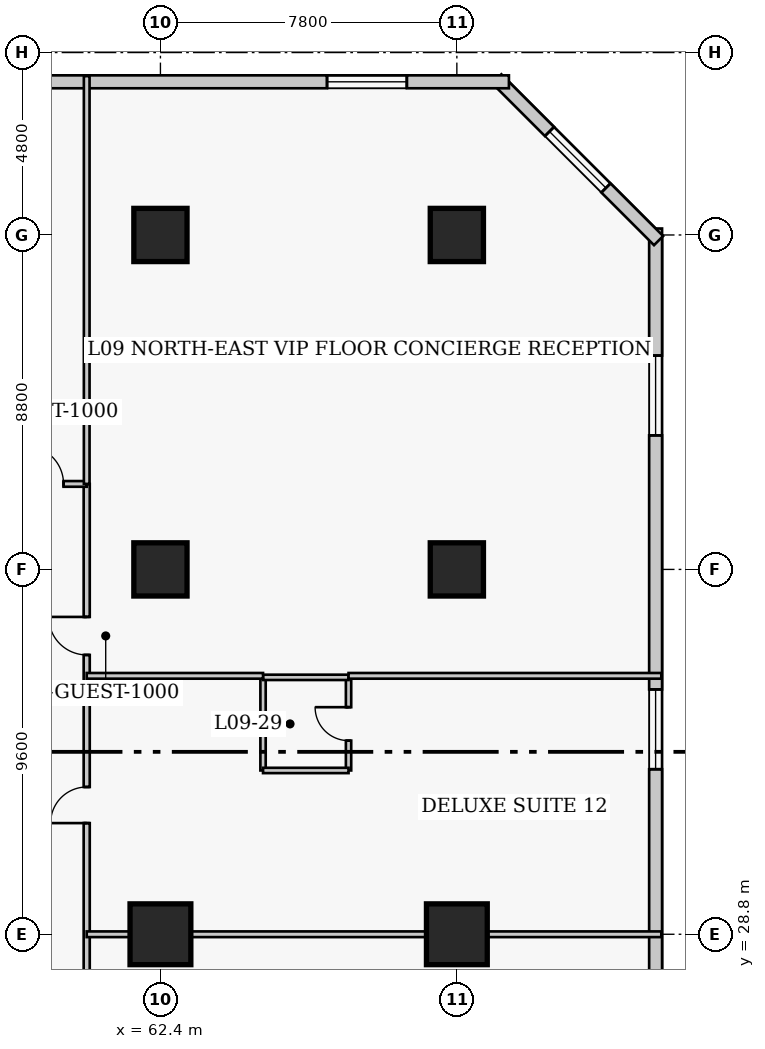
"""IFC4 building model, lengths in metres.
Left out: names, types, materials, properties, quantities, classifications, styles, units other than length and angle.
Written with IfcOpenShell. Run it as: python <this file> out.ifc"""

import sys

from ifc_helpers import new_model, si_unit, direction, frame, frame_2d, origin, origin_2d, place, context, subcontext, project, spatial, rectangle, extrude, element, fill, save


model = new_model("IFC4")
c1 = context("Model", 3, precision=1e-05, world=origin(), true_north=direction((0.0, 1.0)))
c2 = subcontext(c1, "Body", "Model", "MODEL_VIEW")
j1 = project(units=[si_unit("LENGTHUNIT", "METRE"), si_unit("PLANEANGLEUNIT", "RADIAN")], contexts=[c1])
p1 = place(None, origin())
s1 = spatial("IfcSite", under=j1, at=p1, CompositionType="ELEMENT")
p2 = place(p1, origin())
s2 = spatial("IfcBuilding", under=s1, at=p2, CompositionType="ELEMENT")
p3 = place(p2, frame((0.0, 0.0, 41.2)))
s3 = spatial("IfcBuildingStorey", under=s2, at=p3, CompositionType="ELEMENT", Elevation=41.2)
p4 = place(p3, frame((62.4, 28.8, 0.0), z_axis=(0.0, 0.0, 1.0), x_axis=(1.0, 0.0, 0.0)))
e1 = element("IfcColumn", 1, at=p4, inside=s3, PredefinedType="COLUMN", context=c2, shape_type="SweptSolid", body=[
    extrude(rectangle(XDim=1.6, YDim=1.6, at=origin_2d()), origin(), (0.0, 0.0, 1.0), 3.8),
])
for number, where, z_axis, x_axis in (
    (2, (62.4, 38.4, 0.0), (0.0, 0.0, 1.0), (1.0, 0.0, 0.0)),
    (3, (62.4, 47.2, 0.0), (0.0, 0.0, 1.0), (1.0, 0.0, 0.0)),
):
    element("IfcColumn", number, at=place(p3, frame(where, z_axis=z_axis, x_axis=x_axis)), inside=s3, PredefinedType="COLUMN", context=c2, shape_type="SweptSolid", body=[
        extrude(rectangle(XDim=1.4, YDim=1.4, at=origin_2d()), origin(), (0.0, 0.0, 1.0), 3.8),
    ])
p5 = place(p3, frame((70.2, 28.8, 0.0), z_axis=(0.0, 0.0, 1.0), x_axis=(1.0, 0.0, 0.0)))
e4 = element("IfcColumn", 4, at=p5, inside=s3, PredefinedType="COLUMN", context=c2, shape_type="SweptSolid", body=[
    extrude(rectangle(XDim=1.6, YDim=1.6, at=origin_2d()), origin(), (0.0, 0.0, 1.0), 3.8),
])
for number, where, z_axis, x_axis in (
    (5, (70.2, 38.4, 0.0), (0.0, 0.0, 1.0), (1.0, 0.0, 0.0)),
    (6, (70.2, 47.2, 0.0), (0.0, 0.0, 1.0), (1.0, 0.0, 0.0)),
):
    element("IfcColumn", number, at=place(p3, frame(where, z_axis=z_axis, x_axis=x_axis)), inside=s3, PredefinedType="COLUMN", context=c2, shape_type="SweptSolid", body=[
        extrude(rectangle(XDim=1.4, YDim=1.4, at=origin_2d()), origin(), (0.0, 0.0, 1.0), 3.8),
    ])
p6 = place(p3, frame((75.43, 12.23, 0.0), z_axis=(0.0, 0.0, 1.0), x_axis=(0.0, 1.0, 0.0)))
e7 = element("IfcWall", 7, at=p6, inside=s3, PredefinedType="SOLIDWALL", context=c2, shape_type="SweptSolid", body=[
    extrude(rectangle(XDim=35.14, YDim=0.34, at=frame_2d((17.57, 0.0))), origin(), (0.0, 0.0, 1.0), 3.54),
])
p7 = place(p6, frame((3.343, 0.0, 0.85)))
e8 = element("IfcOpeningElement", 8, at=p7, cuts=e7, PredefinedType="OPENING", context=c2, shape_type="SweptSolid", body=[
    extrude(rectangle(XDim=2.1, YDim=1.85, at=frame_2d((1.05, 0.925))), frame((0.0, 0.18, 0.0), z_axis=(0.0, -1.0, 0.0), x_axis=(1.0, 0.0, 0.0)), (0.0, 0.0, 1.0), 0.36),
])
p8 = place(p6, frame((12.127, 0.0, 0.85)))
e9 = element("IfcOpeningElement", 9, at=p8, cuts=e7, PredefinedType="OPENING", context=c2, shape_type="SweptSolid", body=[
    extrude(rectangle(XDim=2.1, YDim=1.85, at=frame_2d((1.05, 0.925))), frame((0.0, 0.18, 0.0), z_axis=(0.0, -1.0, 0.0), x_axis=(1.0, 0.0, 0.0)), (0.0, 0.0, 1.0), 0.36),
])
p9 = place(p6, frame((20.913, 0.0, 0.85)))
e10 = element("IfcOpeningElement", 10, at=p9, cuts=e7, PredefinedType="OPENING", context=c2, shape_type="SweptSolid", body=[
    extrude(rectangle(XDim=2.1, YDim=1.85, at=frame_2d((1.05, 0.925))), frame((0.0, 0.18, 0.0), z_axis=(0.0, -1.0, 0.0), x_axis=(1.0, 0.0, 0.0)), (0.0, 0.0, 1.0), 0.36),
])
p10 = place(p6, frame((29.698, 0.0, 0.85)))
e11 = element("IfcOpeningElement", 11, at=p10, cuts=e7, PredefinedType="OPENING", context=c2, shape_type="SweptSolid", body=[
    extrude(rectangle(XDim=2.1, YDim=1.85, at=frame_2d((1.05, 0.925))), frame((0.0, 0.18, 0.0), z_axis=(0.0, -1.0, 0.0), x_axis=(1.0, 0.0, 0.0)), (0.0, 0.0, 1.0), 0.36),
])
p11 = place(p3, frame((75.508, 47.052, 0.0), z_axis=(0.0, 0.0, 1.0), x_axis=(-0.707106781187, 0.707106781187, 0.0)))
e12 = element("IfcWall", 12, at=p11, inside=s3, PredefinedType="SOLIDWALL", context=c2, shape_type="SweptSolid", body=[
    extrude(rectangle(XDim=6.02, YDim=0.34, at=frame_2d((3.01, 0.0))), origin(), (0.0, 0.0, 1.0), 3.54),
])
p12 = place(p11, frame((1.96, 0.0, 0.85)))
e13 = element("IfcOpeningElement", 13, at=p12, cuts=e12, PredefinedType="OPENING", context=c2, shape_type="SweptSolid", body=[
    extrude(rectangle(XDim=2.1, YDim=1.85, at=frame_2d((1.05, 0.925))), frame((0.0, 0.18, 0.0), z_axis=(0.0, -1.0, 0.0), x_axis=(1.0, 0.0, 0.0)), (0.0, 0.0, 1.0), 0.36),
])
p13 = place(p3, frame((71.57, 51.23, 0.0), z_axis=(0.0, 0.0, 1.0), x_axis=(-1.0, 0.0, 0.0)))
e14 = element("IfcWall", 14, at=p13, inside=s3, PredefinedType="SOLIDWALL", context=c2, shape_type="SweptSolid", body=[
    extrude(rectangle(XDim=29.89, YDim=0.34, at=frame_2d((14.945, 0.0))), origin(), (0.0, 0.0, 1.0), 3.54),
])
p14 = place(p13, frame((2.686, 0.0, 0.85)))
e15 = element("IfcOpeningElement", 15, at=p14, cuts=e14, PredefinedType="OPENING", context=c2, shape_type="SweptSolid", body=[
    extrude(rectangle(XDim=2.1, YDim=1.85, at=frame_2d((1.05, 0.925))), frame((0.0, 0.18, 0.0), z_axis=(0.0, -1.0, 0.0), x_axis=(1.0, 0.0, 0.0)), (0.0, 0.0, 1.0), 0.36),
])
p15 = place(p13, frame((17.631, 0.0, 0.85)))
e16 = element("IfcOpeningElement", 16, at=p15, cuts=e14, PredefinedType="OPENING", context=c2, shape_type="SweptSolid", body=[
    extrude(rectangle(XDim=2.1, YDim=1.85, at=frame_2d((1.05, 0.925))), frame((0.0, 0.18, 0.0), z_axis=(0.0, -1.0, 0.0), x_axis=(1.0, 0.0, 0.0)), (0.0, 0.0, 1.0), 0.36),
])
p16 = place(p13, frame((25.104, 0.0, 0.85)))
e17 = element("IfcOpeningElement", 17, at=p16, cuts=e14, PredefinedType="OPENING", context=c2, shape_type="SweptSolid", body=[
    extrude(rectangle(XDim=2.1, YDim=1.85, at=frame_2d((1.05, 0.925))), frame((0.0, 0.18, 0.0), z_axis=(0.0, -1.0, 0.0), x_axis=(1.0, 0.0, 0.0)), (0.0, 0.0, 1.0), 0.36),
])
p17 = place(p3, frame((60.46, 10.25, 0.0), z_axis=(0.0, 0.0, 1.0), x_axis=(0.0, 1.0, 0.0)))
e18 = element("IfcWall", 18, at=p17, inside=s3, PredefinedType="PARTITIONING", context=c2, shape_type="SweptSolid", body=[
    extrude(rectangle(XDim=30.4, YDim=0.16, at=frame_2d((15.2, 0.0))), origin(), (0.0, 0.0, 1.0), 3.54),
])
p18 = place(p17, frame((4.4, 0.0, 0.0)))
e19 = element("IfcOpeningElement", 19, at=p18, cuts=e18, PredefinedType="OPENING", context=c2, shape_type="SweptSolid", body=[
    extrude(rectangle(XDim=0.95, YDim=2.1, at=frame_2d((0.475, 1.05))), frame((0.0, 0.09, 0.0), z_axis=(0.0, -1.0, 0.0), x_axis=(1.0, 0.0, 0.0)), (0.0, 0.0, 1.0), 0.18),
])
p19 = place(p17, frame((13.675, 0.0, 0.0)))
e20 = element("IfcOpeningElement", 20, at=p19, cuts=e18, PredefinedType="OPENING", context=c2, shape_type="SweptSolid", body=[
    extrude(rectangle(XDim=0.95, YDim=2.1, at=frame_2d((0.475, 1.05))), frame((0.0, 0.09, 0.0), z_axis=(0.0, -1.0, 0.0), x_axis=(1.0, 0.0, 0.0)), (0.0, 0.0, 1.0), 0.18),
])
p20 = place(p17, frame((21.475, 0.0, 0.0)))
e21 = element("IfcOpeningElement", 21, at=p20, cuts=e18, PredefinedType="OPENING", context=c2, shape_type="SweptSolid", body=[
    extrude(rectangle(XDim=0.95, YDim=2.1, at=frame_2d((0.475, 1.05))), frame((0.0, 0.09, 0.0), z_axis=(0.0, -1.0, 0.0), x_axis=(1.0, 0.0, 0.0)), (0.0, 0.0, 1.0), 0.18),
])
p21 = place(p17, frame((25.9, 0.0, 0.0)))
e22 = element("IfcOpeningElement", 22, at=p21, cuts=e18, PredefinedType="OPENING", context=c2, shape_type="SweptSolid", body=[
    extrude(rectangle(XDim=1.0, YDim=2.15, at=frame_2d((0.5, 1.075))), frame((0.0, 0.09, 0.0), z_axis=(0.0, -1.0, 0.0), x_axis=(1.0, 0.0, 0.0)), (0.0, 0.0, 1.0), 0.18),
])
p22 = place(p3, frame((56.8, 40.65, 0.0), z_axis=(0.0, 0.0, 1.0), x_axis=(1.0, 0.0, 0.0)))
e23 = element("IfcWall", 23, at=p22, inside=s3, PredefinedType="PARTITIONING", context=c2, shape_type="SweptSolid", body=[
    extrude(rectangle(XDim=3.66, YDim=0.15, at=frame_2d((1.83, 0.0))), origin(), (0.0, 0.0, 1.0), 3.54),
])
p23 = place(p22, frame((2.05, 0.0, 0.0)))
e24 = element("IfcOpeningElement", 24, at=p23, cuts=e23, PredefinedType="OPENING", context=c2, shape_type="SweptSolid", body=[
    extrude(rectangle(XDim=1.0, YDim=2.15, at=frame_2d((0.5, 1.075))), frame((0.0, 0.085, 0.0), z_axis=(0.0, -1.0, 0.0), x_axis=(1.0, 0.0, 0.0)), (0.0, 0.0, 1.0), 0.17),
])
p24 = place(p3, frame((60.46, 40.65, 0.0), z_axis=(0.0, 0.0, 1.0), x_axis=(0.0, 1.0, 0.0)))
e25 = element("IfcWall", 25, at=p24, inside=s3, PredefinedType="PARTITIONING", context=c2, shape_type="SweptSolid", body=[
    extrude(rectangle(XDim=10.73, YDim=0.15, at=frame_2d((5.365, 0.0))), origin(), (0.0, 0.0, 1.0), 3.54),
])
p25 = place(p3, frame((60.46, 28.8, 0.0), z_axis=(0.0, 0.0, 1.0), x_axis=(1.0, 0.0, 0.0)))
e26 = element("IfcWall", 26, at=p25, inside=s3, PredefinedType="PARTITIONING", context=c2, shape_type="SweptSolid", body=[
    extrude(rectangle(XDim=15.12, YDim=0.15, at=frame_2d((7.56, 0.0))), origin(), (0.0, 0.0, 1.0), 2.593),
])
p26 = place(p3, frame((65.1, 33.11, 0.0), z_axis=(0.0, 0.0, 1.0), x_axis=(0.0, 1.0, 0.0)))
e27 = element("IfcWall", 27, at=p26, inside=s3, PredefinedType="PLUMBINGWALL", context=c2, shape_type="SweptSolid", body=[
    extrude(rectangle(XDim=2.45, YDim=0.14, at=frame_2d((1.225, 0.0))), origin(), (0.0, 0.0, 1.0), 3.54),
])
p27 = place(p3, frame((67.35, 33.11, 0.0), z_axis=(0.0, 0.0, 1.0), x_axis=(0.0, 1.0, 0.0)))
e28 = element("IfcWall", 28, at=p27, inside=s3, PredefinedType="PLUMBINGWALL", context=c2, shape_type="SweptSolid", body=[
    extrude(rectangle(XDim=2.45, YDim=0.14, at=frame_2d((1.225, 0.0))), origin(), (0.0, 0.0, 1.0), 3.54),
])
p28 = place(p27, frame((0.785, 0.0, 0.0)))
e29 = element("IfcOpeningElement", 29, at=p28, cuts=e28, PredefinedType="OPENING", context=c2, shape_type="SweptSolid", body=[
    extrude(rectangle(XDim=0.88, YDim=2.05, at=frame_2d((0.44, 1.025))), frame((0.0, 0.08, 0.0), z_axis=(0.0, -1.0, 0.0), x_axis=(1.0, 0.0, 0.0)), (0.0, 0.0, 1.0), 0.16),
])
for number, where, z_axis, x_axis in (
    (30, (65.1, 33.11, 0.0), (0.0, 0.0, 1.0), (1.0, 0.0, 0.0)),
    (31, (65.1, 35.56, 0.0), (0.0, 0.0, 1.0), (1.0, 0.0, 0.0)),
):
    element("IfcWall", number, at=place(p3, frame(where, z_axis=z_axis, x_axis=x_axis)), inside=s3, PredefinedType="PLUMBINGWALL", context=c2, shape_type="SweptSolid", body=[
        extrude(rectangle(XDim=2.25, YDim=0.14, at=frame_2d((1.125, 0.0))), origin(), (0.0, 0.0, 1.0), 3.54),
    ])
p29 = place(p3, frame((60.46, 35.6, 0.0), z_axis=(0.0, 0.0, 1.0), x_axis=(1.0, 0.0, 0.0)))
e32 = element("IfcWall", 32, at=p29, inside=s3, PredefinedType="PARTITIONING", context=c2, shape_type="SweptSolid", body=[
    extrude(rectangle(XDim=4.64, YDim=0.15, at=frame_2d((2.32, 0.0))), origin(), (0.0, 0.0, 1.0), 3.54),
])
p30 = place(p3, frame((67.35, 35.6, 0.0), z_axis=(0.0, 0.0, 1.0), x_axis=(1.0, 0.0, 0.0)))
e33 = element("IfcWall", 33, at=p30, inside=s3, PredefinedType="PARTITIONING", context=c2, shape_type="SweptSolid", body=[
    extrude(rectangle(XDim=8.23, YDim=0.15, at=frame_2d((4.115, 0.0))), origin(), (0.0, 0.0, 1.0), 3.54),
])
p31 = place(p9, origin())
e34 = element("IfcWindow", 34, at=p31, inside=s3, PartitioningType="SINGLE_PANEL", PredefinedType="WINDOW", context=c2, shape_type="SweptSolid", body=[
    extrude(rectangle(XDim=2.1, YDim=1.85, at=frame_2d((1.05, 0.925))), frame((0.0, 0.03, 0.0), z_axis=(0.0, -1.0, 0.0), x_axis=(1.0, 0.0, 0.0)), (0.0, 0.0, 1.0), 0.06),
])
fill(e10, e34)
p32 = place(p10, origin())
e35 = element("IfcWindow", 35, at=p32, inside=s3, PartitioningType="SINGLE_PANEL", PredefinedType="WINDOW", context=c2, shape_type="SweptSolid", body=[
    extrude(rectangle(XDim=2.1, YDim=1.85, at=frame_2d((1.05, 0.925))), frame((0.0, 0.03, 0.0), z_axis=(0.0, -1.0, 0.0), x_axis=(1.0, 0.0, 0.0)), (0.0, 0.0, 1.0), 0.06),
])
fill(e11, e35)
p33 = place(p12, origin())
e36 = element("IfcWindow", 36, at=p33, inside=s3, PartitioningType="SINGLE_PANEL", PredefinedType="WINDOW", context=c2, shape_type="SweptSolid", body=[
    extrude(rectangle(XDim=2.1, YDim=1.85, at=frame_2d((1.05, 0.925))), frame((0.0, 0.03, 0.0), z_axis=(0.0, -1.0, 0.0), x_axis=(1.0, 0.0, 0.0)), (0.0, 0.0, 1.0), 0.06),
])
fill(e13, e36)
p34 = place(p14, origin())
e37 = element("IfcWindow", 37, at=p34, inside=s3, PartitioningType="SINGLE_PANEL", PredefinedType="WINDOW", context=c2, shape_type="SweptSolid", body=[
    extrude(rectangle(XDim=2.1, YDim=1.85, at=frame_2d((1.05, 0.925))), frame((0.0, 0.03, 0.0), z_axis=(0.0, -1.0, 0.0), x_axis=(1.0, 0.0, 0.0)), (0.0, 0.0, 1.0), 0.06),
])
fill(e15, e37)
p35 = place(p23, origin())
e38 = element("IfcDoor", 38, at=p35, inside=s3, OperationType="SINGLE_SWING_LEFT", PredefinedType="DOOR", context=c2, shape_type="SweptSolid", body=[
    extrude(rectangle(XDim=1.0, YDim=2.15, at=frame_2d((0.5, 1.075))), frame((0.0, 0.025, 0.0), z_axis=(0.0, -1.0, 0.0), x_axis=(1.0, 0.0, 0.0)), (0.0, 0.0, 1.0), 0.05),
])
fill(e24, e38)
p36 = place(p28, origin())
e39 = element("IfcDoor", 39, at=p36, inside=s3, OperationType="SINGLE_SWING_RIGHT", PredefinedType="DOOR", context=c2, shape_type="SweptSolid", body=[
    extrude(rectangle(XDim=0.88, YDim=2.05, at=frame_2d((0.44, 1.025))), frame((0.0, 0.025, 0.0), z_axis=(0.0, -1.0, 0.0), x_axis=(1.0, 0.0, 0.0)), (0.0, 0.0, 1.0), 0.05),
])
fill(e29, e39)
p37 = place(p20, origin())
e40 = element("IfcDoor", 40, at=p37, inside=s3, OperationType="SINGLE_SWING_LEFT", PredefinedType="DOOR", context=c2, shape_type="SweptSolid", body=[
    extrude(rectangle(XDim=0.95, YDim=2.1, at=frame_2d((0.475, 1.05))), frame((0.0, 0.025, 0.0), z_axis=(0.0, -1.0, 0.0), x_axis=(1.0, 0.0, 0.0)), (0.0, 0.0, 1.0), 0.05),
])
fill(e21, e40)
p38 = place(p21, origin())
e41 = element("IfcDoor", 41, at=p38, inside=s3, OperationType="SINGLE_SWING_RIGHT", PredefinedType="DOOR", context=c2, shape_type="SweptSolid", body=[
    extrude(rectangle(XDim=1.0, YDim=2.15, at=frame_2d((0.5, 1.075))), frame((0.0, 0.025, 0.0), z_axis=(0.0, -1.0, 0.0), x_axis=(1.0, 0.0, 0.0)), (0.0, 0.0, 1.0), 0.05),
])
fill(e22, e41)
save(model, sys.argv[1])
